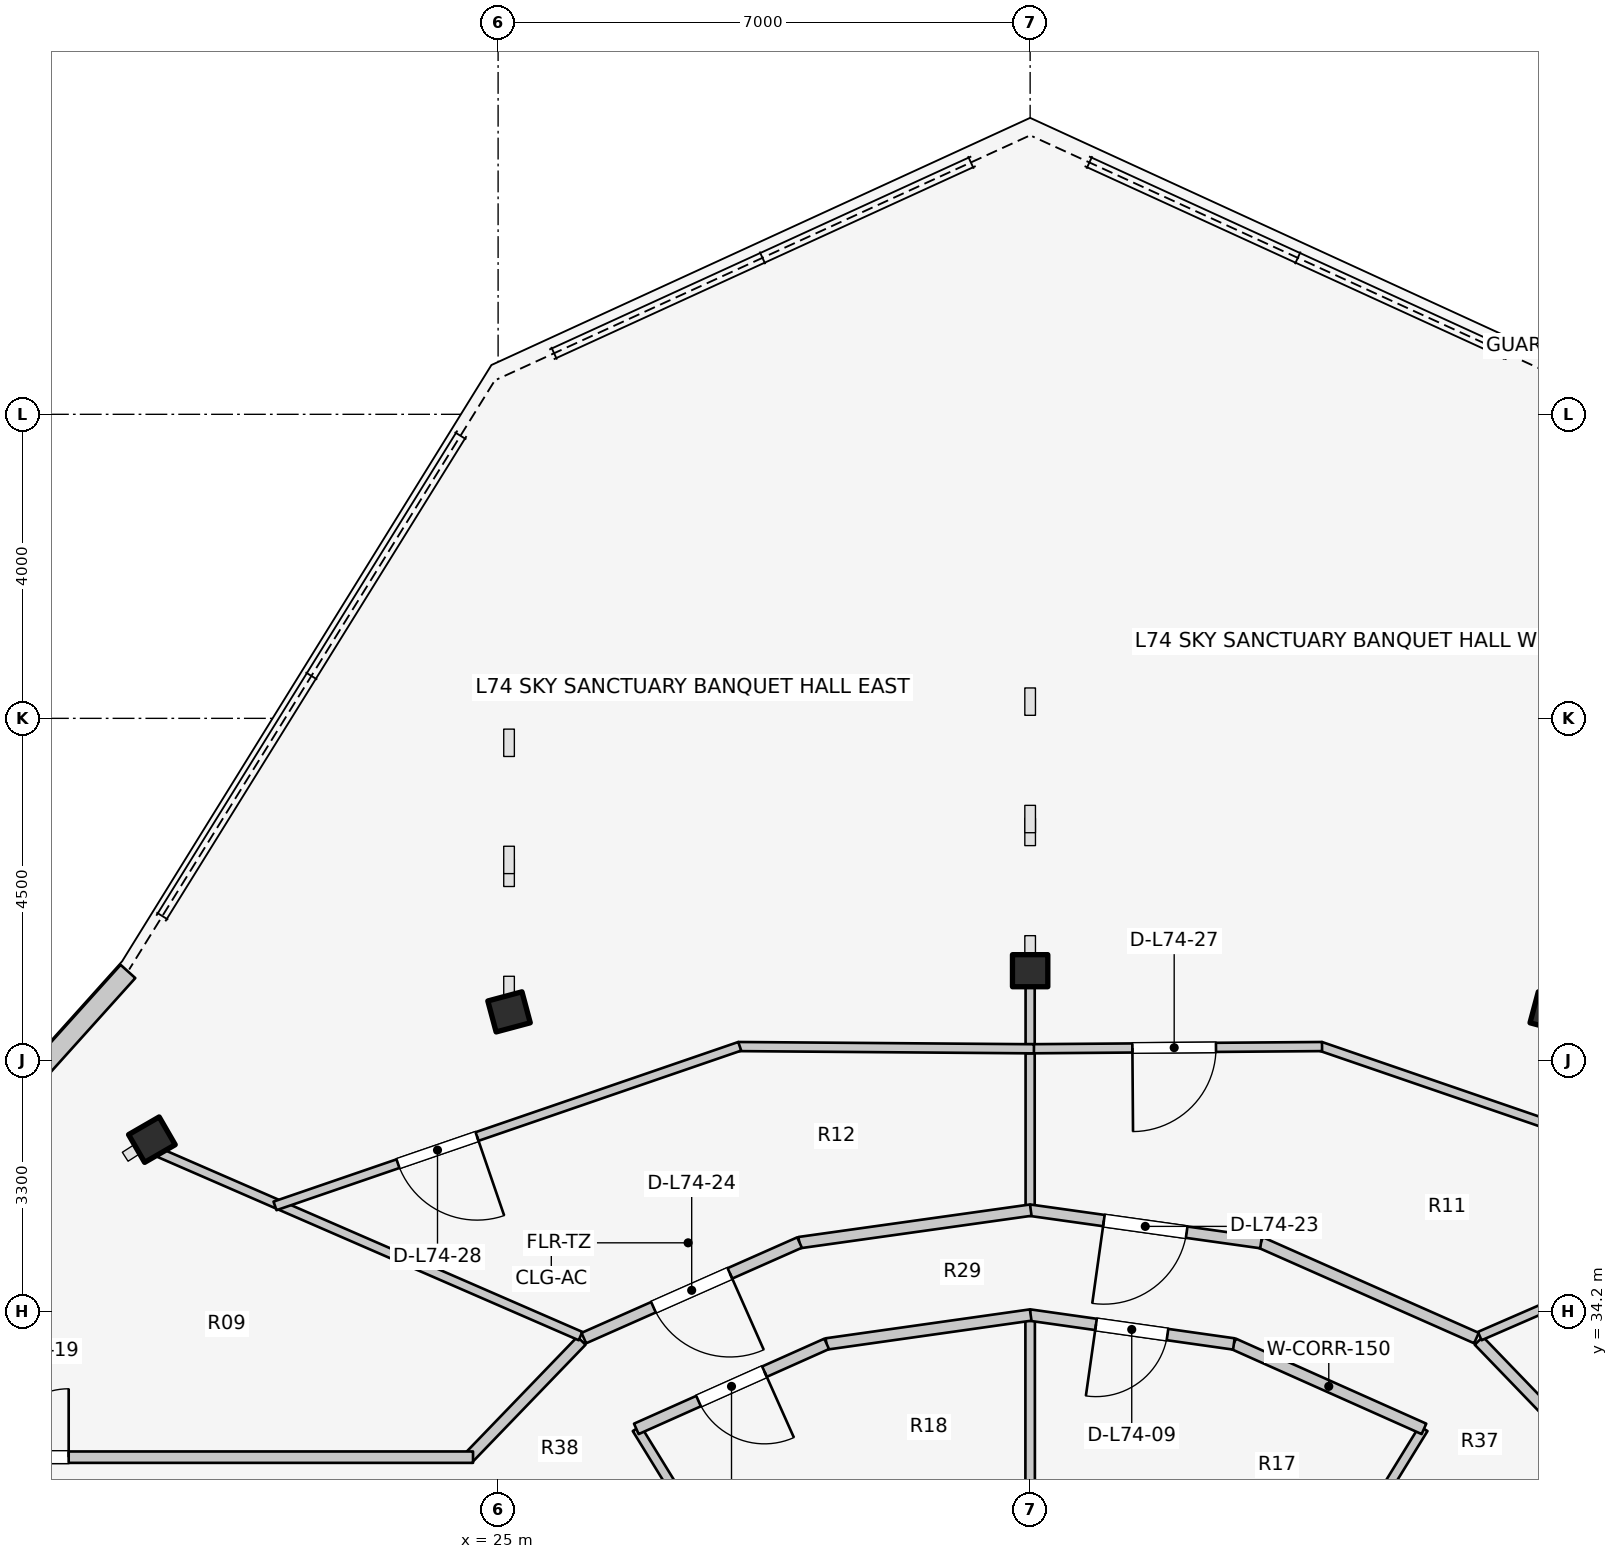
"""IFC4 building model, lengths in metres.
Left out: names, types, materials, properties, quantities, classifications, styles, units other than length and angle.
Written with IfcOpenShell. Run it as: python <this file> out.ifc"""

import sys

from ifc_helpers import new_model, si_unit, direction, frame, frame_2d, origin, origin_2d, place, context, subcontext, project, spatial, rectangle, i_section, extrude, element, fill, save


model = new_model("IFC4")
c1 = context("Model", 3, precision=1e-05, world=origin(), true_north=direction((0.0, 1.0)))
c2 = subcontext(c1, "Body", "Model", "MODEL_VIEW")
j1 = project(units=[si_unit("LENGTHUNIT", "METRE"), si_unit("PLANEANGLEUNIT", "RADIAN")], contexts=[c1])
p1 = place(None, origin())
s1 = spatial("IfcSite", under=j1, at=p1, CompositionType="ELEMENT")
p2 = place(p1, origin())
s2 = spatial("IfcBuilding", under=s1, at=p2, CompositionType="ELEMENT")
p3 = place(p2, frame((0.0, 0.0, 242.4)))
s3 = spatial("IfcBuildingStorey", under=s2, at=p3, CompositionType="ELEMENT", Elevation=242.4)
for number, where, z_axis, x_axis in (
    (1, (38.856, 38.138, 0.0), (0.0, 0.0, 1.0), (0.259, 0.966, 0.0)),
    (2, (32.0, 38.68, 0.0), (0.0, 0.0, 1.0), (0.0, 1.0, 0.0)),
    (3, (25.144, 38.138, 0.0), (0.0, 0.0, 1.0), (-0.259, 0.966, 0.0)),
    (4, (20.445, 36.457, 0.0), (0.0, 0.0, 1.0), (-0.5, 0.866, 0.0)),
):
    element("IfcColumn", number, at=place(p3, frame(where, z_axis=z_axis, x_axis=x_axis)), inside=s3, PredefinedType="COLUMN", context=c2, shape_type="SweptSolid", body=[
        extrude(i_section(OverallWidth=0.422, OverallDepth=0.465, WebThickness=0.045, FlangeThickness=0.073, FilletRadius=0.025, at=origin_2d()), origin(), (0.0, 0.0, 1.0), 3.6),
    ])
p4 = place(p3, frame((20.13, 38.67, 0.0), z_axis=(0.0, 0.0, 1.0), x_axis=(-0.668903560134, -0.743349196031, 0.0)))
e5 = element("IfcWall", 5, at=p4, inside=s3, PredefinedType="STANDARD", context=c2, shape_type="SweptSolid", body=[
    extrude(rectangle(XDim=5.513, YDim=0.26, at=frame_2d((2.756, 0.0))), origin(), (0.0, 0.0, 1.0), 3.29),
])
p5 = place(p3, frame((35.55, 30.015, 0.0), z_axis=(0.0, 0.0, 1.0), x_axis=(0.523992004803, 0.851723182086, 0.0)))
e6 = element("IfcWall", 6, at=p5, inside=s3, PredefinedType="PARTITIONING", context=c2, shape_type="SweptSolid", body=[
    extrude(rectangle(XDim=3.101, YDim=0.125, at=frame_2d((1.551, 0.0))), origin(), (0.0, 0.0, 1.0), 2.672),
])
p6 = place(p3, frame((32.0, 31.1, 0.0), z_axis=(0.0, 0.0, 1.0), x_axis=(0.0, 1.0, 0.0)))
e7 = element("IfcWall", 7, at=p6, inside=s3, PredefinedType="PARTITIONING", context=c2, shape_type="SweptSolid", body=[
    extrude(rectangle(XDim=3.05, YDim=0.125, at=frame_2d((1.525, 0.0))), origin(), (0.0, 0.0, 1.0), 2.672),
])
p7 = place(p3, frame((28.45, 30.015, 0.0), z_axis=(0.0, 0.0, 1.0), x_axis=(-0.523992004803, 0.851723182086, 0.0)))
e8 = element("IfcWall", 8, at=p7, inside=s3, PredefinedType="PARTITIONING", context=c2, shape_type="SweptSolid", body=[
    extrude(rectangle(XDim=3.101, YDim=0.125, at=frame_2d((1.551, 0.0))), origin(), (0.0, 0.0, 1.0), 2.672),
])
p8 = place(p3, frame((37.181, 32.652, 0.0), z_axis=(0.0, 0.0, 1.0), x_axis=(-0.913120130558, 0.407690602257, 0.0)))
e9 = element("IfcWall", 9, at=p8, inside=s3, PredefinedType="PARTITIONING", context=c2, shape_type="SweptSolid", body=[
    extrude(rectangle(XDim=2.743, YDim=0.15, at=frame_2d((1.371, 0.0))), origin(), (0.0, 0.0, 1.0), 2.823),
])
p9 = place(p3, frame((34.68, 33.77, 0.0), z_axis=(0.0, 0.0, 1.0), x_axis=(-0.990132151456, 0.140136799779, 0.0)))
e10 = element("IfcWall", 10, at=p9, inside=s3, PredefinedType="PARTITIONING", context=c2, shape_type="SweptSolid", body=[
    extrude(rectangle(XDim=2.714, YDim=0.15, at=frame_2d((1.357, 0.0))), origin(), (0.0, 0.0, 1.0), 2.823),
])
p10 = place(p9, frame((0.882, 0.0, 0.0)))
e11 = element("IfcOpeningElement", 11, at=p10, cuts=e10, PredefinedType="OPENING", context=c2, shape_type="SweptSolid", body=[
    extrude(rectangle(XDim=0.95, YDim=2.1, at=frame_2d((0.475, 1.05))), frame((0.0, 0.085, 0.0), z_axis=(0.0, -1.0, 0.0), x_axis=(1.0, 0.0, 0.0)), (0.0, 0.0, 1.0), 0.17),
])
p11 = place(p3, frame((32.007, 34.15, 0.0), z_axis=(0.0, 0.0, 1.0), x_axis=(-0.990132151456, -0.140136799779, 0.0)))
e12 = element("IfcWall", 12, at=p11, inside=s3, PredefinedType="PARTITIONING", context=c2, shape_type="SweptSolid", body=[
    extrude(rectangle(XDim=2.714, YDim=0.15, at=frame_2d((1.357, 0.0))), origin(), (0.0, 0.0, 1.0), 2.823),
])
p12 = place(p3, frame((29.323, 33.771, 0.0), z_axis=(0.0, 0.0, 1.0), x_axis=(-0.913120130558, -0.407690602257, 0.0)))
e13 = element("IfcWall", 13, at=p12, inside=s3, PredefinedType="PARTITIONING", context=c2, shape_type="SweptSolid", body=[
    extrude(rectangle(XDim=2.743, YDim=0.15, at=frame_2d((1.371, 0.0))), origin(), (0.0, 0.0, 1.0), 2.823),
])
p13 = place(p12, frame((0.896, 0.0, 0.0)))
e14 = element("IfcOpeningElement", 14, at=p13, cuts=e13, PredefinedType="OPENING", context=c2, shape_type="SweptSolid", body=[
    extrude(rectangle(XDim=0.95, YDim=2.1, at=frame_2d((0.475, 1.05))), frame((0.0, 0.085, 0.0), z_axis=(0.0, -1.0, 0.0), x_axis=(1.0, 0.0, 0.0)), (0.0, 0.0, 1.0), 0.17),
])
for number, where, z_axis, x_axis in (
    (15, (37.903, 33.812, 0.0), (0.0, 0.0, 1.0), (0.694, -0.72, 0.0)),
    (16, (26.097, 33.812, 0.0), (0.0, 0.0, 1.0), (-0.694, -0.72, 0.0)),
):
    element("IfcWall", number, at=place(p3, frame(where, z_axis=z_axis, x_axis=x_axis)), inside=s3, PredefinedType="PARTITIONING", context=c2, shape_type="SweptSolid", body=[
        extrude(rectangle(XDim=2.158, YDim=0.15, at=frame_2d((1.079, 0.0))), origin(), (0.0, 0.0, 1.0), 2.816),
    ])
p14 = place(p3, frame((17.15, 32.28, 0.0), z_axis=(0.0, 0.0, 1.0), x_axis=(1.0, 0.0, 0.0)))
e17 = element("IfcWall", 17, at=p14, inside=s3, PredefinedType="PARTITIONING", context=c2, shape_type="SweptSolid", body=[
    extrude(rectangle(XDim=7.52, YDim=0.15, at=frame_2d((3.76, 0.0))), origin(), (0.0, 0.0, 1.0), 2.816),
])
p15 = place(p14, frame((1.3, 0.0, 0.0)))
e18 = element("IfcOpeningElement", 18, at=p15, cuts=e17, PredefinedType="OPENING", context=c2, shape_type="SweptSolid", body=[
    extrude(rectangle(XDim=0.9, YDim=2.1, at=frame_2d((0.45, 1.05))), frame((0.0, 0.085, 0.0), z_axis=(0.0, -1.0, 0.0), x_axis=(1.0, 0.0, 0.0)), (0.0, 0.0, 1.0), 0.17),
])
p16 = place(p3, frame((37.915, 33.873, 0.0), z_axis=(0.0, 0.0, 1.0), x_axis=(0.916946661839, 0.399009798554, 0.0)))
e19 = element("IfcWall", 19, at=p16, inside=s3, PredefinedType="MOVABLE", context=c2, shape_type="SweptSolid", body=[
    extrude(rectangle(XDim=6.042, YDim=0.12, at=frame_2d((3.021, 0.0))), origin(), (0.0, 0.0, 1.0), 2.66),
])
p17 = place(p3, frame((32.0, 35.585, 0.0), z_axis=(0.0, 0.0, 1.0), x_axis=(0.0, 1.0, 0.0)))
e20 = element("IfcWall", 20, at=p17, inside=s3, PredefinedType="MOVABLE", context=c2, shape_type="SweptSolid", body=[
    extrude(rectangle(XDim=2.895, YDim=0.12, at=frame_2d((1.448, 0.0))), origin(), (0.0, 0.0, 1.0), 2.66),
])
p18 = place(p3, frame((26.085, 33.873, 0.0), z_axis=(0.0, 0.0, 1.0), x_axis=(-0.916946661839, 0.399009798554, 0.0)))
e21 = element("IfcWall", 21, at=p18, inside=s3, PredefinedType="MOVABLE", context=c2, shape_type="SweptSolid", body=[
    extrude(rectangle(XDim=6.042, YDim=0.12, at=frame_2d((3.021, 0.0))), origin(), (0.0, 0.0, 1.0), 2.66),
])
p19 = place(p3, frame((37.872, 33.847, 0.0), z_axis=(0.0, 0.0, 1.0), x_axis=(-0.914384748819, 0.404846305563, 0.0)))
e22 = element("IfcWall", 22, at=p19, inside=s3, PredefinedType="PARTITIONING", context=c2, shape_type="SweptSolid", body=[
    extrude(rectangle(XDim=3.104, YDim=0.15, at=frame_2d((1.552, 0.0))), origin(), (0.0, 0.0, 1.0), 2.823),
])
p20 = place(p3, frame((35.038, 35.103, 0.0), z_axis=(0.0, 0.0, 1.0), x_axis=(-0.990295701983, 0.138976338396, 0.0)))
e23 = element("IfcWall", 23, at=p20, inside=s3, PredefinedType="PARTITIONING", context=c2, shape_type="SweptSolid", body=[
    extrude(rectangle(XDim=3.076, YDim=0.15, at=frame_2d((1.538, 0.0))), origin(), (0.0, 0.0, 1.0), 2.823),
])
p21 = place(p20, frame((0.988, 0.0, 0.0)))
e24 = element("IfcOpeningElement", 24, at=p21, cuts=e23, PredefinedType="OPENING", context=c2, shape_type="SweptSolid", body=[
    extrude(rectangle(XDim=1.1, YDim=2.1, at=frame_2d((0.55, 1.05))), frame((0.0, 0.085, 0.0), z_axis=(0.0, -1.0, 0.0), x_axis=(1.0, 0.0, 0.0)), (0.0, 0.0, 1.0), 0.17),
])
p22 = place(p3, frame((32.008, 35.53, 0.0), z_axis=(0.0, 0.0, 1.0), x_axis=(-0.990295701983, -0.138976338396, 0.0)))
e25 = element("IfcWall", 25, at=p22, inside=s3, PredefinedType="PARTITIONING", context=c2, shape_type="SweptSolid", body=[
    extrude(rectangle(XDim=3.076, YDim=0.15, at=frame_2d((1.538, 0.0))), origin(), (0.0, 0.0, 1.0), 2.823),
])
p23 = place(p3, frame((28.966, 35.104, 0.0), z_axis=(0.0, 0.0, 1.0), x_axis=(-0.914384748819, -0.404846305563, 0.0)))
e26 = element("IfcWall", 26, at=p23, inside=s3, PredefinedType="PARTITIONING", context=c2, shape_type="SweptSolid", body=[
    extrude(rectangle(XDim=3.104, YDim=0.15, at=frame_2d((1.552, 0.0))), origin(), (0.0, 0.0, 1.0), 2.823),
])
p24 = place(p23, frame((1.002, 0.0, 0.0)))
e27 = element("IfcOpeningElement", 27, at=p24, cuts=e26, PredefinedType="OPENING", context=c2, shape_type="SweptSolid", body=[
    extrude(rectangle(XDim=1.1, YDim=2.1, at=frame_2d((0.55, 1.05))), frame((0.0, 0.085, 0.0), z_axis=(0.0, -1.0, 0.0), x_axis=(1.0, 0.0, 0.0)), (0.0, 0.0, 1.0), 0.17),
])
p25 = place(p3, frame((41.935, 35.586, 0.0), z_axis=(0.0, 0.0, 1.0), x_axis=(-0.945789589552, 0.324780005995, 0.0)))
e28 = element("IfcWall", 28, at=p25, inside=s3, PredefinedType="MOVABLE", context=c2, shape_type="SweptSolid", body=[
    extrude(rectangle(XDim=6.465, YDim=0.12, at=frame_2d((3.232, 0.0))), origin(), (0.0, 0.0, 1.0), 2.823),
])
p26 = place(p3, frame((35.841, 37.682, 0.0), z_axis=(0.0, 0.0, 1.0), x_axis=(-0.999971175398, -0.007592652624, 0.0)))
e29 = element("IfcWall", 29, at=p26, inside=s3, PredefinedType="MOVABLE", context=c2, shape_type="SweptSolid", body=[
    extrude(rectangle(XDim=3.891, YDim=0.12, at=frame_2d((1.945, 0.0))), origin(), (0.0, 0.0, 1.0), 2.823),
])
p27 = place(p26, frame((1.395, 0.0, 0.0)))
e30 = element("IfcOpeningElement", 30, at=p27, cuts=e29, PredefinedType="OPENING", context=c2, shape_type="SweptSolid", body=[
    extrude(rectangle(XDim=1.1, YDim=2.1, at=frame_2d((0.55, 1.05))), frame((0.0, 0.07, 0.0), z_axis=(0.0, -1.0, 0.0), x_axis=(1.0, 0.0, 0.0)), (0.0, 0.0, 1.0), 0.14),
])
p28 = place(p3, frame((32.05, 37.653, 0.0), z_axis=(0.0, 0.0, 1.0), x_axis=(-0.999971175398, 0.007592652624, 0.0)))
e31 = element("IfcWall", 31, at=p28, inside=s3, PredefinedType="MOVABLE", context=c2, shape_type="SweptSolid", body=[
    extrude(rectangle(XDim=3.891, YDim=0.12, at=frame_2d((1.945, 0.0))), origin(), (0.0, 0.0, 1.0), 2.823),
])
p29 = place(p3, frame((28.179, 37.685, 0.0), z_axis=(0.0, 0.0, 1.0), x_axis=(-0.945789589552, -0.324780005995, 0.0)))
e32 = element("IfcWall", 32, at=p29, inside=s3, PredefinedType="MOVABLE", context=c2, shape_type="SweptSolid", body=[
    extrude(rectangle(XDim=6.465, YDim=0.12, at=frame_2d((3.232, 0.0))), origin(), (0.0, 0.0, 1.0), 2.823),
])
p30 = place(p29, frame((3.654, 0.0, 0.0)))
e33 = element("IfcOpeningElement", 33, at=p30, cuts=e32, PredefinedType="OPENING", context=c2, shape_type="SweptSolid", body=[
    extrude(rectangle(XDim=1.1, YDim=2.1, at=frame_2d((0.55, 1.05))), frame((0.0, 0.07, 0.0), z_axis=(0.0, -1.0, 0.0), x_axis=(1.0, 0.0, 0.0)), (0.0, 0.0, 1.0), 0.14),
])
p31 = place(p10, origin())
e34 = element("IfcDoor", 34, at=p31, inside=s3, OperationType="SINGLE_SWING_RIGHT", PredefinedType="DOOR", context=c2, shape_type="SweptSolid", body=[
    extrude(rectangle(XDim=0.95, YDim=2.1, at=frame_2d((0.475, 1.05))), frame((0.0, 0.025, 0.0), z_axis=(0.0, -1.0, 0.0), x_axis=(1.0, 0.0, 0.0)), (0.0, 0.0, 1.0), 0.05),
])
fill(e11, e34)
p32 = place(p13, origin())
e35 = element("IfcDoor", 35, at=p32, inside=s3, OperationType="SINGLE_SWING_LEFT", PredefinedType="DOOR", context=c2, shape_type="SweptSolid", body=[
    extrude(rectangle(XDim=0.95, YDim=2.1, at=frame_2d((0.475, 1.05))), frame((0.0, 0.025, 0.0), z_axis=(0.0, -1.0, 0.0), x_axis=(1.0, 0.0, 0.0)), (0.0, 0.0, 1.0), 0.05),
])
fill(e14, e35)
p33 = place(p15, origin())
e36 = element("IfcDoor", 36, at=p33, inside=s3, OperationType="SINGLE_SWING_RIGHT", PredefinedType="DOOR", context=c2, shape_type="SweptSolid", body=[
    extrude(rectangle(XDim=0.9, YDim=2.1, at=frame_2d((0.45, 1.05))), frame((0.0, 0.025, 0.0), z_axis=(0.0, -1.0, 0.0), x_axis=(1.0, 0.0, 0.0)), (0.0, 0.0, 1.0), 0.05),
])
fill(e18, e36)
p34 = place(p21, origin())
e37 = element("IfcDoor", 37, at=p34, inside=s3, OperationType="SINGLE_SWING_RIGHT", PredefinedType="DOOR", context=c2, shape_type="SweptSolid", body=[
    extrude(rectangle(XDim=1.1, YDim=2.1, at=frame_2d((0.55, 1.05))), frame((0.0, 0.025, 0.0), z_axis=(0.0, -1.0, 0.0), x_axis=(1.0, 0.0, 0.0)), (0.0, 0.0, 1.0), 0.05),
])
fill(e24, e37)
p35 = place(p24, origin())
e38 = element("IfcDoor", 38, at=p35, inside=s3, OperationType="SINGLE_SWING_LEFT", PredefinedType="DOOR", context=c2, shape_type="SweptSolid", body=[
    extrude(rectangle(XDim=1.1, YDim=2.1, at=frame_2d((0.55, 1.05))), frame((0.0, 0.025, 0.0), z_axis=(0.0, -1.0, 0.0), x_axis=(1.0, 0.0, 0.0)), (0.0, 0.0, 1.0), 0.05),
])
fill(e27, e38)
p36 = place(p27, origin())
e39 = element("IfcDoor", 39, at=p36, inside=s3, OperationType="SINGLE_SWING_RIGHT", PredefinedType="DOOR", context=c2, shape_type="SweptSolid", body=[
    extrude(rectangle(XDim=1.1, YDim=2.1, at=frame_2d((0.55, 1.05))), frame((0.0, 0.025, 0.0), z_axis=(0.0, -1.0, 0.0), x_axis=(1.0, 0.0, 0.0)), (0.0, 0.0, 1.0), 0.05),
])
fill(e30, e39)
p37 = place(p30, origin())
e40 = element("IfcDoor", 40, at=p37, inside=s3, OperationType="SINGLE_SWING_LEFT", PredefinedType="DOOR", context=c2, shape_type="SweptSolid", body=[
    extrude(rectangle(XDim=1.1, YDim=2.1, at=frame_2d((0.55, 1.05))), frame((0.0, 0.025, 0.0), z_axis=(0.0, -1.0, 0.0), x_axis=(1.0, 0.0, 0.0)), (0.0, 0.0, 1.0), 0.05),
])
fill(e33, e40)
save(model, sys.argv[1])
